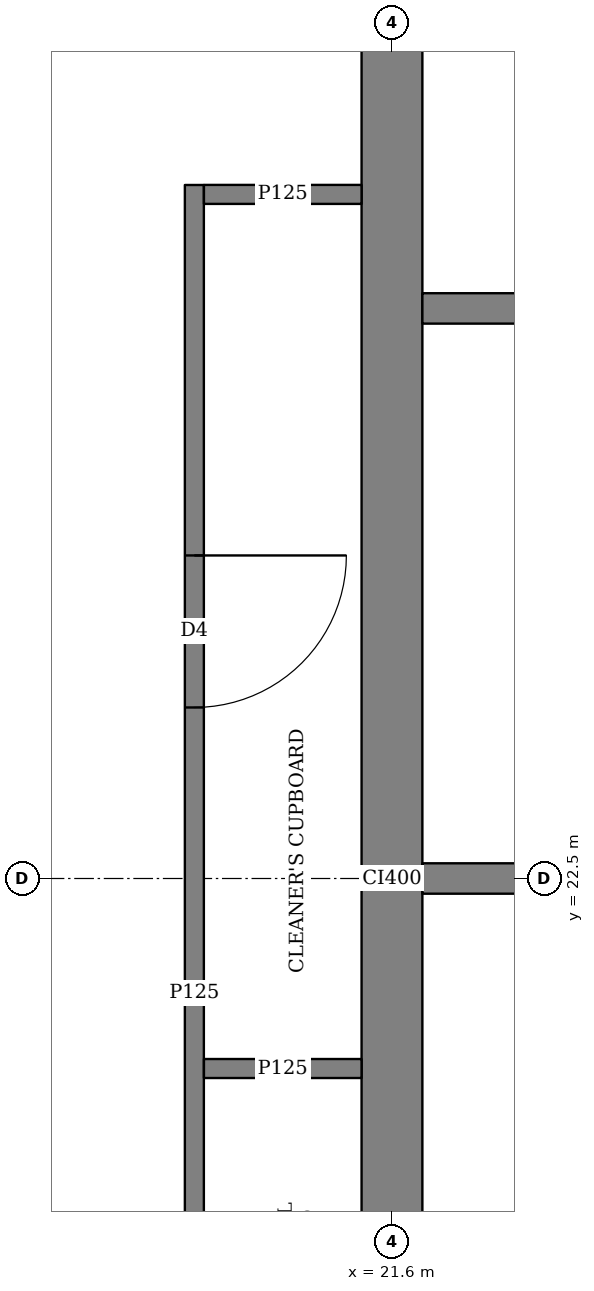
"""IFC4 building model, lengths in metres.
Left out: names, types, materials, properties, quantities, classifications, styles, units other than length and angle.
Written with IfcOpenShell. Run it as: python <this file> out.ifc"""

import sys

from ifc_helpers import new_model, si_unit, direction, frame, frame_2d, origin, place, context, subcontext, project, spatial, rectangle, extrude, element, fill, save


model = new_model("IFC4")
c1 = context("Model", 3, precision=1e-05, world=origin(), true_north=direction((0.0, 1.0)))
c2 = subcontext(c1, "Body", "Model", "MODEL_VIEW")
j1 = project(units=[si_unit("LENGTHUNIT", "METRE"), si_unit("PLANEANGLEUNIT", "RADIAN")], contexts=[c1])
p1 = place(None, origin())
s1 = spatial("IfcSite", under=j1, at=p1, CompositionType="ELEMENT")
p2 = place(p1, origin())
s2 = spatial("IfcBuilding", under=s1, at=p2, CompositionType="ELEMENT")
p3 = place(p2, frame((0.0, 0.0, 42.5)))
s3 = spatial("IfcBuildingStorey", under=s2, at=p3, CompositionType="ELEMENT", Elevation=42.5)
p4 = place(p3, frame((21.6, 15.45, 0.0), z_axis=(0.0, 0.0, 1.0), x_axis=(0.0, 1.0, 0.0)))
e1 = element("IfcWall", 1, at=p4, inside=s3, PredefinedType="SHEAR", context=c2, shape_type="SweptSolid", body=[
    extrude(rectangle(XDim=14.1, YDim=0.4, at=frame_2d((7.05, 0.0))), origin(), (0.0, 0.0, 1.0), 3.75),
])
p5 = place(p3, frame((20.3, 16.438, 0.0), z_axis=(0.0, 0.0, 1.0), x_axis=(0.0, 1.0, 0.0)))
e2 = element("IfcWall", 2, at=p5, inside=s3, PredefinedType="PARTITIONING", context=c2, shape_type="SweptSolid", body=[
    extrude(rectangle(XDim=10.624, YDim=0.125, at=frame_2d((5.312, 0.0))), origin(), (0.0, 0.0, 1.0), 3.5),
])
p6 = place(p5, frame((1.937, 0.0, 0.0)))
e3 = element("IfcOpeningElement", 3, at=p6, cuts=e2, PredefinedType="OPENING", context=c2, shape_type="SweptSolid", body=[
    extrude(rectangle(XDim=1.0, YDim=2.1, at=frame_2d((0.5, 1.05))), frame((0.0, 0.073, 0.0), z_axis=(0.0, -1.0, 0.0), x_axis=(1.0, 0.0, 0.0)), (0.0, 0.0, 1.0), 0.145),
])
p7 = place(p5, frame((7.187, 0.0, 0.0)))
e4 = element("IfcOpeningElement", 4, at=p7, cuts=e2, PredefinedType="OPENING", context=c2, shape_type="SweptSolid", body=[
    extrude(rectangle(XDim=1.0, YDim=2.1, at=frame_2d((0.5, 1.05))), frame((0.0, 0.073, 0.0), z_axis=(0.0, -1.0, 0.0), x_axis=(1.0, 0.0, 0.0)), (0.0, 0.0, 1.0), 0.145),
])
for number, where, z_axis, x_axis in (
    (5, (20.363, 27.0, 0.0), (0.0, 0.0, 1.0), (1.0, 0.0, 0.0)),
    (6, (20.363, 21.25, 0.0), (0.0, 0.0, 1.0), (1.0, 0.0, 0.0)),
):
    element("IfcWall", number, at=place(p3, frame(where, z_axis=z_axis, x_axis=x_axis)), inside=s3, PredefinedType="PARTITIONING", context=c2, shape_type="SweptSolid", body=[
        extrude(rectangle(XDim=1.037, YDim=0.125, at=frame_2d((0.519, 0.0))), origin(), (0.0, 0.0, 1.0), 3.5),
    ])
for number, where, z_axis, x_axis in (
    (7, (21.8, 22.5, 0.0), (0.0, 0.0, 1.0), (1.0, 0.0, 0.0)),
    (8, (21.8, 26.25, 0.0), (0.0, 0.0, 1.0), (1.0, 0.0, 0.0)),
):
    element("IfcWall", number, at=place(p3, frame(where, z_axis=z_axis, x_axis=x_axis)), inside=s3, PredefinedType="SOLIDWALL", context=c2, shape_type="SweptSolid", body=[
        extrude(rectangle(XDim=2.2, YDim=0.2, at=frame_2d((1.1, 0.0))), origin(), (0.0, 0.0, 1.0), 3.5),
    ])
p8 = place(p7, origin())
e9 = element("IfcDoor", 9, at=p8, inside=s3, OperationType="SINGLE_SWING_LEFT", PredefinedType="DOOR", context=c2, shape_type="SweptSolid", body=[
    extrude(rectangle(XDim=1.0, YDim=2.1, at=frame_2d((0.5, 1.05))), frame((0.0, 0.025, 0.0), z_axis=(0.0, -1.0, 0.0), x_axis=(1.0, 0.0, 0.0)), (0.0, 0.0, 1.0), 0.05),
])
fill(e4, e9)
save(model, sys.argv[1])
